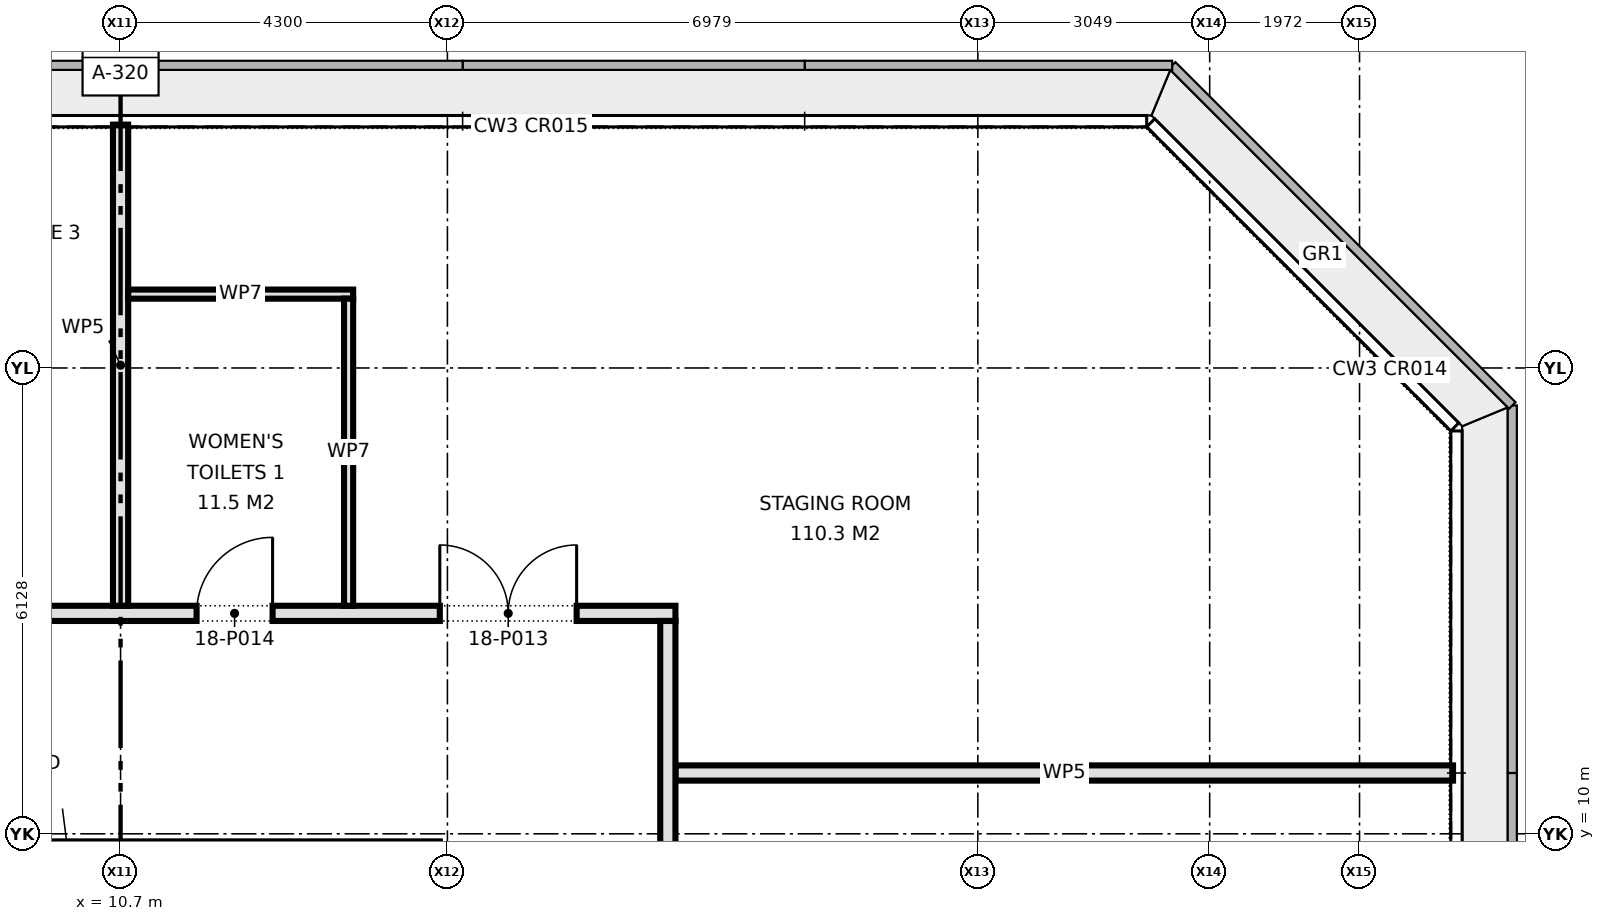
"""IFC4 building model, lengths in metres.
Left out: names, types, materials, properties, quantities, classifications, styles, units other than length and angle.
Written with IfcOpenShell. Run it as: python <this file> out.ifc"""

import sys

from ifc_helpers import new_model, si_unit, direction, frame, frame_2d, origin, place, context, subcontext, project, spatial, rectangle, extrude, element, fill, save


model = new_model("IFC4")
c1 = context("Model", 3, precision=1e-05, world=origin(), true_north=direction((0.0, 1.0)))
c2 = subcontext(c1, "Body", "Model", "MODEL_VIEW")
j1 = project(units=[si_unit("LENGTHUNIT", "METRE"), si_unit("PLANEANGLEUNIT", "RADIAN")], contexts=[c1])
p1 = place(None, origin())
s1 = spatial("IfcSite", under=j1, at=p1, CompositionType="ELEMENT")
p2 = place(p1, origin())
s2 = spatial("IfcBuilding", under=s1, at=p2, CompositionType="ELEMENT")
p3 = place(p2, frame((0.0, 0.0, 82.0)))
s3 = spatial("IfcBuildingStorey", under=s2, at=p3, CompositionType="ELEMENT", Elevation=82.0)
p4 = place(p3, frame((18.0, 10.8, 0.0), z_axis=(0.0, 0.0, 1.0), x_axis=(1.0, 0.0, 0.0)))
e1 = element("IfcWall", 1, at=p4, inside=s3, PredefinedType="PARTITIONING", context=c2, shape_type="SweptSolid", body=[
    extrude(rectangle(XDim=10.23, YDim=0.2, at=frame_2d((5.115, 0.0))), origin(), (0.0, 0.0, 1.0), 4.2),
])
p5 = place(p3, frame((-18.0, 12.9, 0.0), z_axis=(0.0, 0.0, 1.0), x_axis=(1.0, 0.0, 0.0)))
e2 = element("IfcWall", 2, at=p5, inside=s3, PredefinedType="PARTITIONING", context=c2, shape_type="SweptSolid", body=[
    extrude(rectangle(XDim=36.0, YDim=0.2, at=frame_2d((18.0, 0.0))), origin(), (0.0, 0.0, 1.0), 4.2),
])
p6 = place(p5, frame((4.8, 0.0, 0.0)))
e3 = element("IfcOpeningElement", 3, at=p6, cuts=e2, PredefinedType="OPENING", context=c2, shape_type="SweptSolid", body=[
    extrude(rectangle(XDim=1.2, YDim=2.1, at=frame_2d((0.6, 1.05))), frame((0.0, 0.11, 0.0), z_axis=(0.0, -1.0, 0.0), x_axis=(1.0, 0.0, 0.0)), (0.0, 0.0, 1.0), 0.22),
])
p7 = place(p5, frame((14.6, 0.0, 0.0)))
e4 = element("IfcOpeningElement", 4, at=p7, cuts=e2, PredefinedType="OPENING", context=c2, shape_type="SweptSolid", body=[
    extrude(rectangle(XDim=1.2, YDim=2.1, at=frame_2d((0.6, 1.05))), frame((0.0, 0.11, 0.0), z_axis=(0.0, -1.0, 0.0), x_axis=(1.0, 0.0, 0.0)), (0.0, 0.0, 1.0), 0.22),
])
p8 = place(p5, frame((23.3, 0.0, 0.0)))
e5 = element("IfcOpeningElement", 5, at=p8, cuts=e2, PredefinedType="OPENING", context=c2, shape_type="SweptSolid", body=[
    extrude(rectangle(XDim=1.8, YDim=2.1, at=frame_2d((0.9, 1.05))), frame((0.0, 0.11, 0.0), z_axis=(0.0, -1.0, 0.0), x_axis=(1.0, 0.0, 0.0)), (0.0, 0.0, 1.0), 0.22),
])
p9 = place(p5, frame((32.9, 0.0, 0.0)))
e6 = element("IfcOpeningElement", 6, at=p9, cuts=e2, PredefinedType="OPENING", context=c2, shape_type="SweptSolid", body=[
    extrude(rectangle(XDim=1.8, YDim=2.1, at=frame_2d((0.9, 1.05))), frame((0.0, 0.11, 0.0), z_axis=(0.0, -1.0, 0.0), x_axis=(1.0, 0.0, 0.0)), (0.0, 0.0, 1.0), 0.22),
])
p10 = place(p5, frame((29.7, 0.0, 0.0)))
e7 = element("IfcOpeningElement", 7, at=p10, cuts=e2, PredefinedType="OPENING", context=c2, shape_type="SweptSolid", body=[
    extrude(rectangle(XDim=1.0, YDim=2.1, at=frame_2d((0.5, 1.05))), frame((0.0, 0.11, 0.0), z_axis=(0.0, -1.0, 0.0), x_axis=(1.0, 0.0, 0.0)), (0.0, 0.0, 1.0), 0.22),
])
p11 = place(p3, frame((17.9, -12.8, 0.0), z_axis=(0.0, 0.0, 1.0), x_axis=(0.0, 1.0, 0.0)))
e8 = element("IfcWall", 8, at=p11, inside=s3, PredefinedType="PARTITIONING", context=c2, shape_type="SweptSolid", body=[
    extrude(rectangle(XDim=25.6, YDim=0.2, at=frame_2d((12.8, 0.0))), origin(), (0.0, 0.0, 1.0), 4.2),
])
p12 = place(p11, frame((4.4, 0.0, 0.0)))
e9 = element("IfcOpeningElement", 9, at=p12, cuts=e8, PredefinedType="OPENING", context=c2, shape_type="SweptSolid", body=[
    extrude(rectangle(XDim=1.2, YDim=2.1, at=frame_2d((0.6, 1.05))), frame((0.0, 0.11, 0.0), z_axis=(0.0, -1.0, 0.0), x_axis=(1.0, 0.0, 0.0)), (0.0, 0.0, 1.0), 0.22),
])
p13 = place(p11, frame((15.95, 0.0, 0.0)))
e10 = element("IfcOpeningElement", 10, at=p13, cuts=e8, PredefinedType="OPENING", context=c2, shape_type="SweptSolid", body=[
    extrude(rectangle(XDim=1.8, YDim=2.1, at=frame_2d((0.9, 1.05))), frame((0.0, 0.11, 0.0), z_axis=(0.0, -1.0, 0.0), x_axis=(1.0, 0.0, 0.0)), (0.0, 0.0, 1.0), 0.22),
])
p14 = place(p3, frame((10.7, 13.0, 0.0), z_axis=(0.0, 0.0, 1.0), x_axis=(0.0, 1.0, 0.0)))
e11 = element("IfcWall", 11, at=p14, inside=s3, PredefinedType="PARTITIONING", context=c2, shape_type="SweptSolid", body=[
    extrude(rectangle(XDim=6.33, YDim=0.2, at=frame_2d((3.165, 0.0))), origin(), (0.0, 0.0, 1.0), 4.2),
])
p15 = place(p3, frame((10.8, 17.1, 0.0), z_axis=(0.0, 0.0, 1.0), x_axis=(1.0, 0.0, 0.0)))
e12 = element("IfcWall", 12, at=p15, inside=s3, PredefinedType="PARTITIONING", context=c2, shape_type="SweptSolid", body=[
    extrude(rectangle(XDim=2.96, YDim=0.12, at=frame_2d((1.48, 0.0))), origin(), (0.0, 0.0, 1.0), 4.2),
])
p16 = place(p3, frame((13.7, 13.0, 0.0), z_axis=(0.0, 0.0, 1.0), x_axis=(0.0, 1.0, 0.0)))
e13 = element("IfcWall", 13, at=p16, inside=s3, PredefinedType="PARTITIONING", context=c2, shape_type="SweptSolid", body=[
    extrude(rectangle(XDim=4.04, YDim=0.12, at=frame_2d((2.02, 0.0))), origin(), (0.0, 0.0, 1.0), 4.2),
])
p17 = place(p9, origin())
e14 = element("IfcDoor", 14, at=p17, inside=s3, OperationType="DOUBLE_DOOR_SINGLE_SWING", PredefinedType="DOOR", context=c2, shape_type="SweptSolid", body=[
    extrude(rectangle(XDim=1.8, YDim=2.1, at=frame_2d((0.9, 1.05))), frame((0.0, 0.025, 0.0), z_axis=(0.0, -1.0, 0.0), x_axis=(1.0, 0.0, 0.0)), (0.0, 0.0, 1.0), 0.05),
])
fill(e6, e14)
p18 = place(p10, origin())
e15 = element("IfcDoor", 15, at=p18, inside=s3, OperationType="SINGLE_SWING_RIGHT", PredefinedType="DOOR", context=c2, shape_type="SweptSolid", body=[
    extrude(rectangle(XDim=1.0, YDim=2.1, at=frame_2d((0.5, 1.05))), frame((0.0, 0.025, 0.0), z_axis=(0.0, -1.0, 0.0), x_axis=(1.0, 0.0, 0.0)), (0.0, 0.0, 1.0), 0.05),
])
fill(e7, e15)
save(model, sys.argv[1])
